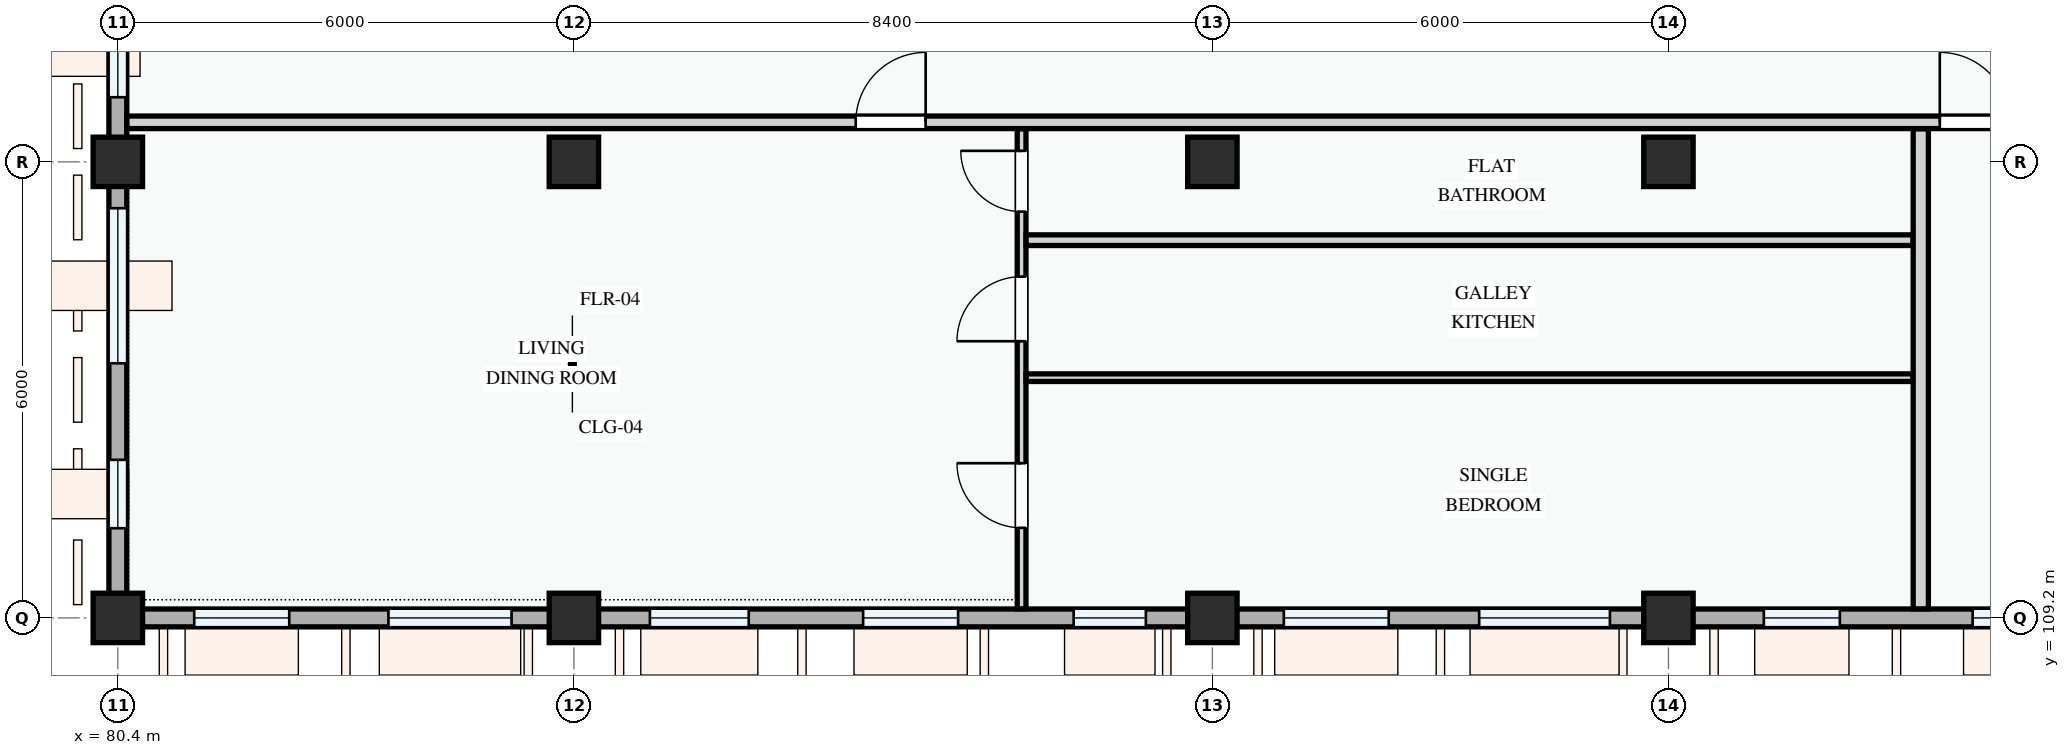
"""IFC4 building model, lengths in metres.
Left out: names, types, materials, properties, quantities, classifications, styles, units other than length and angle.
Written with IfcOpenShell. Run it as: python <this file> out.ifc"""

import sys

from ifc_helpers import new_model, si_unit, direction, frame, frame_2d, origin, origin_2d, place, context, subcontext, project, spatial, rectangle, extrude, element, fill, save


model = new_model("IFC4")
c1 = context("Model", 3, precision=1e-05, world=origin(), true_north=direction((0.0, 1.0)))
c2 = subcontext(c1, "Body", "Model", "MODEL_VIEW")
j1 = project(units=[si_unit("LENGTHUNIT", "METRE"), si_unit("PLANEANGLEUNIT", "RADIAN")], contexts=[c1])
p1 = place(None, origin())
s1 = spatial("IfcSite", under=j1, at=p1, CompositionType="ELEMENT")
p2 = place(p1, origin())
s2 = spatial("IfcBuilding", under=s1, at=p2, CompositionType="ELEMENT")
p3 = place(p2, frame((0.0, 0.0, 8.1)))
s3 = spatial("IfcBuildingStorey", under=s2, at=p3, CompositionType="ELEMENT", Elevation=8.1)
for number, where, z_axis, x_axis in (
    (1, (80.4, 109.2, 0.0), (0.0, 0.0, 1.0), (1.0, 0.0, 0.0)),
    (2, (80.4, 115.2, 0.0), (0.0, 0.0, 1.0), (1.0, 0.0, 0.0)),
    (3, (86.4, 109.2, 0.0), (0.0, 0.0, 1.0), (1.0, 0.0, 0.0)),
    (4, (86.4, 115.2, 0.0), (0.0, 0.0, 1.0), (1.0, 0.0, 0.0)),
    (5, (94.8, 109.2, 0.0), (0.0, 0.0, 1.0), (1.0, 0.0, 0.0)),
    (6, (94.8, 115.2, 0.0), (0.0, 0.0, 1.0), (1.0, 0.0, 0.0)),
    (7, (100.8, 109.2, 0.0), (0.0, 0.0, 1.0), (1.0, 0.0, 0.0)),
    (8, (100.8, 115.2, 0.0), (0.0, 0.0, 1.0), (1.0, 0.0, 0.0)),
):
    element("IfcColumn", number, at=place(p3, frame(where, z_axis=z_axis, x_axis=x_axis)), inside=s3, PredefinedType="COLUMN", context=c2, shape_type="SweptSolid", body=[
        extrude(rectangle(XDim=0.65, YDim=0.65, at=origin_2d()), origin(), (0.0, 0.0, 1.0), 3.3),
    ])
p4 = place(p3, frame((80.4, 123.6, 0.0), z_axis=(0.0, 0.0, 1.0), x_axis=(0.0, -1.0, 0.0)))
e9 = element("IfcWall", 9, at=p4, inside=s3, PredefinedType="STANDARD", context=c2, shape_type="SweptSolid", body=[
    extrude(rectangle(XDim=8.4, YDim=0.235, at=frame_2d((4.2, 0.0))), origin(), (0.0, 0.0, 1.0), 2.425),
])
p5 = place(p4, frame((0.492, 0.0, 0.78)))
e10 = element("IfcOpeningElement", 10, at=p5, cuts=e9, PredefinedType="OPENING", context=c2, shape_type="SweptSolid", body=[
    extrude(rectangle(XDim=2.38, YDim=1.48, at=frame_2d((1.19, 0.74))), frame((0.0, 0.127, 0.0), z_axis=(0.0, -1.0, 0.0), x_axis=(1.0, 0.0, 0.0)), (0.0, 0.0, 1.0), 0.255),
])
p6 = place(p4, frame((3.877, 0.0, 0.78)))
e11 = element("IfcOpeningElement", 11, at=p6, cuts=e9, PredefinedType="OPENING", context=c2, shape_type="SweptSolid", body=[
    extrude(rectangle(XDim=1.3, YDim=1.4, at=frame_2d((0.65, 0.7))), frame((0.0, 0.127, 0.0), z_axis=(0.0, -1.0, 0.0), x_axis=(1.0, 0.0, 0.0)), (0.0, 0.0, 1.0), 0.255),
])
p7 = place(p4, frame((6.35, 0.0, 0.78)))
e12 = element("IfcOpeningElement", 12, at=p7, cuts=e9, PredefinedType="OPENING", context=c2, shape_type="SweptSolid", body=[
    extrude(rectangle(XDim=1.2, YDim=1.35, at=frame_2d((0.6, 0.675))), frame((0.0, 0.127, 0.0), z_axis=(0.0, -1.0, 0.0), x_axis=(1.0, 0.0, 0.0)), (0.0, 0.0, 1.0), 0.255),
])
p8 = place(p3, frame((80.4, 115.2, 0.0), z_axis=(0.0, 0.0, 1.0), x_axis=(0.0, -1.0, 0.0)))
e13 = element("IfcWall", 13, at=p8, inside=s3, PredefinedType="STANDARD", context=c2, shape_type="SweptSolid", body=[
    extrude(rectangle(XDim=6.0, YDim=0.235, at=frame_2d((3.0, 0.0))), origin(), (0.0, 0.0, 1.0), 2.575),
])
p9 = place(p8, frame((0.61, 0.0, 0.78)))
e14 = element("IfcOpeningElement", 14, at=p9, cuts=e13, PredefinedType="OPENING", context=c2, shape_type="SweptSolid", body=[
    extrude(rectangle(XDim=2.04, YDim=1.46, at=frame_2d((1.02, 0.73))), frame((0.0, 0.127, 0.0), z_axis=(0.0, -1.0, 0.0), x_axis=(1.0, 0.0, 0.0)), (0.0, 0.0, 1.0), 0.255),
])
p10 = place(p8, frame((3.92, 0.0, 0.78)))
e15 = element("IfcOpeningElement", 15, at=p10, cuts=e13, PredefinedType="OPENING", context=c2, shape_type="SweptSolid", body=[
    extrude(rectangle(XDim=0.9, YDim=1.2, at=frame_2d((0.45, 0.6))), frame((0.0, 0.127, 0.0), z_axis=(0.0, -1.0, 0.0), x_axis=(1.0, 0.0, 0.0)), (0.0, 0.0, 1.0), 0.255),
])
p11 = place(p3, frame((80.4, 109.2, 0.0), z_axis=(0.0, 0.0, 1.0), x_axis=(1.0, 0.0, 0.0)))
e16 = element("IfcWall", 16, at=p11, inside=s3, PredefinedType="STANDARD", context=c2, shape_type="SweptSolid", body=[
    extrude(rectangle(XDim=6.0, YDim=0.235, at=frame_2d((3.0, 0.0))), origin(), (0.0, 0.0, 1.0), 2.475),
])
p12 = place(p11, frame((1.005, 0.0, 0.78)))
e17 = element("IfcOpeningElement", 17, at=p12, cuts=e16, PredefinedType="OPENING", context=c2, shape_type="SweptSolid", body=[
    extrude(rectangle(XDim=1.25, YDim=1.45, at=frame_2d((0.625, 0.725))), frame((0.0, 0.127, 0.0), z_axis=(0.0, -1.0, 0.0), x_axis=(1.0, 0.0, 0.0)), (0.0, 0.0, 1.0), 0.255),
])
p13 = place(p11, frame((3.56, 0.0, 0.78)))
e18 = element("IfcOpeningElement", 18, at=p13, cuts=e16, PredefinedType="OPENING", context=c2, shape_type="SweptSolid", body=[
    extrude(rectangle(XDim=1.62, YDim=1.38, at=frame_2d((0.81, 0.69))), frame((0.0, 0.127, 0.0), z_axis=(0.0, -1.0, 0.0), x_axis=(1.0, 0.0, 0.0)), (0.0, 0.0, 1.0), 0.255),
])
p14 = place(p3, frame((86.4, 109.2, 0.0), z_axis=(0.0, 0.0, 1.0), x_axis=(1.0, 0.0, 0.0)))
e19 = element("IfcWall", 19, at=p14, inside=s3, PredefinedType="STANDARD", context=c2, shape_type="SweptSolid", body=[
    extrude(rectangle(XDim=8.4, YDim=0.235, at=frame_2d((4.2, 0.0))), origin(), (0.0, 0.0, 1.0), 2.375),
])
p15 = place(p14, frame((1.0, 0.0, 0.78)))
e20 = element("IfcOpeningElement", 20, at=p15, cuts=e19, PredefinedType="OPENING", context=c2, shape_type="SweptSolid", body=[
    extrude(rectangle(XDim=1.3, YDim=1.4, at=frame_2d((0.65, 0.7))), frame((0.0, 0.127, 0.0), z_axis=(0.0, -1.0, 0.0), x_axis=(1.0, 0.0, 0.0)), (0.0, 0.0, 1.0), 0.255),
])
p16 = place(p14, frame((3.805, 0.0, 0.78)))
e21 = element("IfcOpeningElement", 21, at=p16, cuts=e19, PredefinedType="OPENING", context=c2, shape_type="SweptSolid", body=[
    extrude(rectangle(XDim=1.25, YDim=1.3, at=frame_2d((0.625, 0.65))), frame((0.0, 0.127, 0.0), z_axis=(0.0, -1.0, 0.0), x_axis=(1.0, 0.0, 0.0)), (0.0, 0.0, 1.0), 0.255),
])
p17 = place(p14, frame((6.575, 0.0, 0.78)))
e22 = element("IfcOpeningElement", 22, at=p17, cuts=e19, PredefinedType="OPENING", context=c2, shape_type="SweptSolid", body=[
    extrude(rectangle(XDim=0.95, YDim=1.15, at=frame_2d((0.475, 0.575))), frame((0.0, 0.127, 0.0), z_axis=(0.0, -1.0, 0.0), x_axis=(1.0, 0.0, 0.0)), (0.0, 0.0, 1.0), 0.255),
])
p18 = place(p3, frame((94.8, 109.2, 0.0), z_axis=(0.0, 0.0, 1.0), x_axis=(1.0, 0.0, 0.0)))
e23 = element("IfcWall", 23, at=p18, inside=s3, PredefinedType="STANDARD", context=c2, shape_type="SweptSolid", body=[
    extrude(rectangle(XDim=6.0, YDim=0.235, at=frame_2d((3.0, 0.0))), origin(), (0.0, 0.0, 1.0), 2.475),
])
p19 = place(p18, frame((0.94, 0.0, 0.78)))
e24 = element("IfcOpeningElement", 24, at=p19, cuts=e23, PredefinedType="OPENING", context=c2, shape_type="SweptSolid", body=[
    extrude(rectangle(XDim=1.38, YDim=1.48, at=frame_2d((0.69, 0.74))), frame((0.0, 0.127, 0.0), z_axis=(0.0, -1.0, 0.0), x_axis=(1.0, 0.0, 0.0)), (0.0, 0.0, 1.0), 0.255),
])
p20 = place(p18, frame((3.51, 0.0, 0.78)))
e25 = element("IfcOpeningElement", 25, at=p20, cuts=e23, PredefinedType="OPENING", context=c2, shape_type="SweptSolid", body=[
    extrude(rectangle(XDim=1.72, YDim=1.52, at=frame_2d((0.86, 0.76))), frame((0.0, 0.127, 0.0), z_axis=(0.0, -1.0, 0.0), x_axis=(1.0, 0.0, 0.0)), (0.0, 0.0, 1.0), 0.255),
])
p21 = place(p3, frame((100.8, 109.2, 0.0), z_axis=(0.0, 0.0, 1.0), x_axis=(1.0, 0.0, 0.0)))
e26 = element("IfcWall", 26, at=p21, inside=s3, PredefinedType="STANDARD", context=c2, shape_type="SweptSolid", body=[
    extrude(rectangle(XDim=8.4, YDim=0.235, at=frame_2d((4.2, 0.0))), origin(), (0.0, 0.0, 1.0), 2.375),
])
p22 = place(p21, frame((1.255, 0.0, 0.78)))
e27 = element("IfcOpeningElement", 27, at=p22, cuts=e26, PredefinedType="OPENING", context=c2, shape_type="SweptSolid", body=[
    extrude(rectangle(XDim=1.0, YDim=1.25, at=frame_2d((0.5, 0.625))), frame((0.0, 0.127, 0.0), z_axis=(0.0, -1.0, 0.0), x_axis=(1.0, 0.0, 0.0)), (0.0, 0.0, 1.0), 0.255),
])
p23 = place(p21, frame((4.002, 0.0, 0.78)))
e28 = element("IfcOpeningElement", 28, at=p23, cuts=e26, PredefinedType="OPENING", context=c2, shape_type="SweptSolid", body=[
    extrude(rectangle(XDim=1.15, YDim=1.25, at=frame_2d((0.575, 0.625))), frame((0.0, 0.127, 0.0), z_axis=(0.0, -1.0, 0.0), x_axis=(1.0, 0.0, 0.0)), (0.0, 0.0, 1.0), 0.255),
])
p24 = place(p21, frame((6.163, 0.0, 0.78)))
e29 = element("IfcOpeningElement", 29, at=p24, cuts=e26, PredefinedType="OPENING", context=c2, shape_type="SweptSolid", body=[
    extrude(rectangle(XDim=1.58, YDim=1.48, at=frame_2d((0.79, 0.74))), frame((0.0, 0.127, 0.0), z_axis=(0.0, -1.0, 0.0), x_axis=(1.0, 0.0, 0.0)), (0.0, 0.0, 1.0), 0.255),
])
p25 = place(p3, frame((92.29, 109.32, 0.0), z_axis=(0.0, 0.0, 1.0), x_axis=(0.0, 1.0, 0.0)))
e30 = element("IfcWall", 30, at=p25, inside=s3, PredefinedType="PARTITIONING", context=c2, shape_type="SweptSolid", body=[
    extrude(rectangle(XDim=6.316, YDim=0.115, at=frame_2d((3.158, 0.0))), origin(), (0.0, 0.0, 1.0), 3.0),
])
p26 = place(p25, frame((1.066, 0.0, 0.0)))
e31 = element("IfcOpeningElement", 31, at=p26, cuts=e30, PredefinedType="OPENING", context=c2, shape_type="SweptSolid", body=[
    extrude(rectangle(XDim=0.85, YDim=2.1, at=frame_2d((0.425, 1.05))), frame((0.0, 0.067, 0.0), z_axis=(0.0, -1.0, 0.0), x_axis=(1.0, 0.0, 0.0)), (0.0, 0.0, 1.0), 0.135),
])
p27 = place(p25, frame((3.521, 0.0, 0.0)))
e32 = element("IfcOpeningElement", 32, at=p27, cuts=e30, PredefinedType="OPENING", context=c2, shape_type="SweptSolid", body=[
    extrude(rectangle(XDim=0.85, YDim=2.1, at=frame_2d((0.425, 1.05))), frame((0.0, 0.067, 0.0), z_axis=(0.0, -1.0, 0.0), x_axis=(1.0, 0.0, 0.0)), (0.0, 0.0, 1.0), 0.135),
])
p28 = place(p25, frame((5.225, 0.0, 0.0)))
e33 = element("IfcOpeningElement", 33, at=p28, cuts=e30, PredefinedType="OPENING", context=c2, shape_type="SweptSolid", body=[
    extrude(rectangle(XDim=0.8, YDim=2.1, at=frame_2d((0.4, 1.05))), frame((0.0, 0.067, 0.0), z_axis=(0.0, -1.0, 0.0), x_axis=(1.0, 0.0, 0.0)), (0.0, 0.0, 1.0), 0.135),
])
p29 = place(p3, frame((92.35, 112.361, 0.0), z_axis=(0.0, 0.0, 1.0), x_axis=(1.0, 0.0, 0.0)))
e34 = element("IfcWall", 34, at=p29, inside=s3, PredefinedType="PARTITIONING", context=c2, shape_type="SweptSolid", body=[
    extrude(rectangle(XDim=11.668, YDim=0.1, at=frame_2d((5.834, 0.0))), origin(), (0.0, 0.0, 1.0), 3.0),
])
p30 = place(p3, frame((92.35, 114.17, 0.0), z_axis=(0.0, 0.0, 1.0), x_axis=(1.0, 0.0, 0.0)))
e35 = element("IfcWall", 35, at=p30, inside=s3, PredefinedType="PARTITIONING", context=c2, shape_type="SweptSolid", body=[
    extrude(rectangle(XDim=11.668, YDim=0.14, at=frame_2d((5.834, 0.0))), origin(), (0.0, 0.0, 1.0), 3.0),
])
p31 = place(p3, frame((104.12, 109.32, 0.0), z_axis=(0.0, 0.0, 1.0), x_axis=(0.0, 1.0, 0.0)))
e36 = element("IfcWall", 36, at=p31, inside=s3, PredefinedType="PARTITIONING", context=c2, shape_type="SweptSolid", body=[
    extrude(rectangle(XDim=6.316, YDim=0.2, at=frame_2d((3.158, 0.0))), origin(), (0.0, 0.0, 1.0), 3.0),
])
p32 = place(p3, frame((80.52, 115.72, 0.0), z_axis=(0.0, 0.0, 1.0), x_axis=(1.0, 0.0, 0.0)))
e37 = element("IfcWall", 37, at=p32, inside=s3, PredefinedType="PARTITIONING", context=c2, shape_type="SweptSolid", body=[
    extrude(rectangle(XDim=69.531, YDim=0.165, at=frame_2d((34.765, 0.0))), origin(), (0.0, 0.0, 1.0), 3.0),
])
p33 = place(p32, frame((9.588, 0.0, 0.0)))
e38 = element("IfcOpeningElement", 38, at=p33, cuts=e37, PredefinedType="OPENING", context=c2, shape_type="SweptSolid", body=[
    extrude(rectangle(XDim=0.92, YDim=2.1, at=frame_2d((0.46, 1.05))), frame((0.0, 0.093, 0.0), z_axis=(0.0, -1.0, 0.0), x_axis=(1.0, 0.0, 0.0)), (0.0, 0.0, 1.0), 0.185),
])
p34 = place(p32, frame((23.851, 0.0, 0.0)))
e39 = element("IfcOpeningElement", 39, at=p34, cuts=e37, PredefinedType="OPENING", context=c2, shape_type="SweptSolid", body=[
    extrude(rectangle(XDim=0.92, YDim=2.1, at=frame_2d((0.46, 1.05))), frame((0.0, 0.093, 0.0), z_axis=(0.0, -1.0, 0.0), x_axis=(1.0, 0.0, 0.0)), (0.0, 0.0, 1.0), 0.185),
])
p35 = place(p32, frame((52.798, 0.0, 0.0)))
e40 = element("IfcOpeningElement", 40, at=p35, cuts=e37, PredefinedType="OPENING", context=c2, shape_type="SweptSolid", body=[
    extrude(rectangle(XDim=0.96, YDim=2.12, at=frame_2d((0.48, 1.06))), frame((0.0, 0.093, 0.0), z_axis=(0.0, -1.0, 0.0), x_axis=(1.0, 0.0, 0.0)), (0.0, 0.0, 1.0), 0.185),
])
p36 = place(p7, origin())
e41 = element("IfcWindow", 41, at=p36, inside=s3, PartitioningType="SINGLE_PANEL", PredefinedType="WINDOW", context=c2, shape_type="SweptSolid", body=[
    extrude(rectangle(XDim=1.2, YDim=1.35, at=frame_2d((0.6, 0.675))), frame((0.0, 0.03, 0.0), z_axis=(0.0, -1.0, 0.0), x_axis=(1.0, 0.0, 0.0)), (0.0, 0.0, 1.0), 0.06),
])
fill(e12, e41)
p37 = place(p9, origin())
e42 = element("IfcWindow", 42, at=p37, inside=s3, PartitioningType="DOUBLE_PANEL_VERTICAL", PredefinedType="WINDOW", context=c2, shape_type="SweptSolid", body=[
    extrude(rectangle(XDim=2.04, YDim=1.46, at=frame_2d((1.02, 0.73))), frame((0.0, 0.03, 0.0), z_axis=(0.0, -1.0, 0.0), x_axis=(1.0, 0.0, 0.0)), (0.0, 0.0, 1.0), 0.06),
])
fill(e14, e42)
p38 = place(p10, origin())
e43 = element("IfcWindow", 43, at=p38, inside=s3, PartitioningType="SINGLE_PANEL", PredefinedType="WINDOW", context=c2, shape_type="SweptSolid", body=[
    extrude(rectangle(XDim=0.9, YDim=1.2, at=frame_2d((0.45, 0.6))), frame((0.0, 0.03, 0.0), z_axis=(0.0, -1.0, 0.0), x_axis=(1.0, 0.0, 0.0)), (0.0, 0.0, 1.0), 0.06),
])
fill(e15, e43)
p39 = place(p12, origin())
e44 = element("IfcWindow", 44, at=p39, inside=s3, PartitioningType="SINGLE_PANEL", PredefinedType="WINDOW", context=c2, shape_type="SweptSolid", body=[
    extrude(rectangle(XDim=1.25, YDim=1.45, at=frame_2d((0.625, 0.725))), frame((0.0, 0.03, 0.0), z_axis=(0.0, -1.0, 0.0), x_axis=(1.0, 0.0, 0.0)), (0.0, 0.0, 1.0), 0.06),
])
fill(e17, e44)
p40 = place(p13, origin())
e45 = element("IfcWindow", 45, at=p40, inside=s3, PartitioningType="DOUBLE_PANEL_VERTICAL", PredefinedType="WINDOW", context=c2, shape_type="SweptSolid", body=[
    extrude(rectangle(XDim=1.62, YDim=1.38, at=frame_2d((0.81, 0.69))), frame((0.0, 0.03, 0.0), z_axis=(0.0, -1.0, 0.0), x_axis=(1.0, 0.0, 0.0)), (0.0, 0.0, 1.0), 0.06),
])
fill(e18, e45)
p41 = place(p15, origin())
e46 = element("IfcWindow", 46, at=p41, inside=s3, PartitioningType="SINGLE_PANEL", PredefinedType="WINDOW", context=c2, shape_type="SweptSolid", body=[
    extrude(rectangle(XDim=1.3, YDim=1.4, at=frame_2d((0.65, 0.7))), frame((0.0, 0.03, 0.0), z_axis=(0.0, -1.0, 0.0), x_axis=(1.0, 0.0, 0.0)), (0.0, 0.0, 1.0), 0.06),
])
fill(e20, e46)
p42 = place(p16, origin())
e47 = element("IfcWindow", 47, at=p42, inside=s3, PartitioningType="SINGLE_PANEL", PredefinedType="WINDOW", context=c2, shape_type="SweptSolid", body=[
    extrude(rectangle(XDim=1.25, YDim=1.3, at=frame_2d((0.625, 0.65))), frame((0.0, 0.03, 0.0), z_axis=(0.0, -1.0, 0.0), x_axis=(1.0, 0.0, 0.0)), (0.0, 0.0, 1.0), 0.06),
])
fill(e21, e47)
p43 = place(p17, origin())
e48 = element("IfcWindow", 48, at=p43, inside=s3, PartitioningType="SINGLE_PANEL", PredefinedType="WINDOW", context=c2, shape_type="SweptSolid", body=[
    extrude(rectangle(XDim=0.95, YDim=1.15, at=frame_2d((0.475, 0.575))), frame((0.0, 0.03, 0.0), z_axis=(0.0, -1.0, 0.0), x_axis=(1.0, 0.0, 0.0)), (0.0, 0.0, 1.0), 0.06),
])
fill(e22, e48)
p44 = place(p19, origin())
e49 = element("IfcWindow", 49, at=p44, inside=s3, PartitioningType="SINGLE_PANEL", PredefinedType="WINDOW", context=c2, shape_type="SweptSolid", body=[
    extrude(rectangle(XDim=1.38, YDim=1.48, at=frame_2d((0.69, 0.74))), frame((0.0, 0.03, 0.0), z_axis=(0.0, -1.0, 0.0), x_axis=(1.0, 0.0, 0.0)), (0.0, 0.0, 1.0), 0.06),
])
fill(e24, e49)
p45 = place(p20, origin())
e50 = element("IfcWindow", 50, at=p45, inside=s3, PartitioningType="DOUBLE_PANEL_VERTICAL", PredefinedType="WINDOW", context=c2, shape_type="SweptSolid", body=[
    extrude(rectangle(XDim=1.72, YDim=1.52, at=frame_2d((0.86, 0.76))), frame((0.0, 0.03, 0.0), z_axis=(0.0, -1.0, 0.0), x_axis=(1.0, 0.0, 0.0)), (0.0, 0.0, 1.0), 0.06),
])
fill(e25, e50)
p46 = place(p22, origin())
e51 = element("IfcWindow", 51, at=p46, inside=s3, PartitioningType="SINGLE_PANEL", PredefinedType="WINDOW", context=c2, shape_type="SweptSolid", body=[
    extrude(rectangle(XDim=1.0, YDim=1.25, at=frame_2d((0.5, 0.625))), frame((0.0, 0.03, 0.0), z_axis=(0.0, -1.0, 0.0), x_axis=(1.0, 0.0, 0.0)), (0.0, 0.0, 1.0), 0.06),
])
fill(e27, e51)
p47 = place(p23, origin())
e52 = element("IfcWindow", 52, at=p47, inside=s3, PartitioningType="SINGLE_PANEL", PredefinedType="WINDOW", context=c2, shape_type="SweptSolid", body=[
    extrude(rectangle(XDim=1.15, YDim=1.25, at=frame_2d((0.575, 0.625))), frame((0.0, 0.03, 0.0), z_axis=(0.0, -1.0, 0.0), x_axis=(1.0, 0.0, 0.0)), (0.0, 0.0, 1.0), 0.06),
])
fill(e28, e52)
p48 = place(p26, origin())
e53 = element("IfcDoor", 53, at=p48, inside=s3, OperationType="SINGLE_SWING_RIGHT", PredefinedType="DOOR", context=c2, shape_type="SweptSolid", body=[
    extrude(rectangle(XDim=0.85, YDim=2.1, at=frame_2d((0.425, 1.05))), frame((0.0, 0.025, 0.0), z_axis=(0.0, -1.0, 0.0), x_axis=(1.0, 0.0, 0.0)), (0.0, 0.0, 1.0), 0.05),
])
fill(e31, e53)
p49 = place(p27, origin())
e54 = element("IfcDoor", 54, at=p49, inside=s3, OperationType="SINGLE_SWING_LEFT", PredefinedType="DOOR", context=c2, shape_type="SweptSolid", body=[
    extrude(rectangle(XDim=0.85, YDim=2.1, at=frame_2d((0.425, 1.05))), frame((0.0, 0.025, 0.0), z_axis=(0.0, -1.0, 0.0), x_axis=(1.0, 0.0, 0.0)), (0.0, 0.0, 1.0), 0.05),
])
fill(e32, e54)
p50 = place(p28, origin())
e55 = element("IfcDoor", 55, at=p50, inside=s3, OperationType="SINGLE_SWING_RIGHT", PredefinedType="DOOR", context=c2, shape_type="SweptSolid", body=[
    extrude(rectangle(XDim=0.8, YDim=2.1, at=frame_2d((0.4, 1.05))), frame((0.0, 0.025, 0.0), z_axis=(0.0, -1.0, 0.0), x_axis=(1.0, 0.0, 0.0)), (0.0, 0.0, 1.0), 0.05),
])
fill(e33, e55)
p51 = place(p33, origin())
e56 = element("IfcDoor", 56, at=p51, inside=s3, OperationType="SINGLE_SWING_RIGHT", PredefinedType="DOOR", context=c2, shape_type="SweptSolid", body=[
    extrude(rectangle(XDim=0.92, YDim=2.1, at=frame_2d((0.46, 1.05))), frame((0.0, 0.025, 0.0), z_axis=(0.0, -1.0, 0.0), x_axis=(1.0, 0.0, 0.0)), (0.0, 0.0, 1.0), 0.05),
])
fill(e38, e56)
p52 = place(p34, origin())
e57 = element("IfcDoor", 57, at=p52, inside=s3, OperationType="SINGLE_SWING_LEFT", PredefinedType="DOOR", context=c2, shape_type="SweptSolid", body=[
    extrude(rectangle(XDim=0.92, YDim=2.1, at=frame_2d((0.46, 1.05))), frame((0.0, 0.025, 0.0), z_axis=(0.0, -1.0, 0.0), x_axis=(1.0, 0.0, 0.0)), (0.0, 0.0, 1.0), 0.05),
])
fill(e39, e57)
save(model, sys.argv[1])
